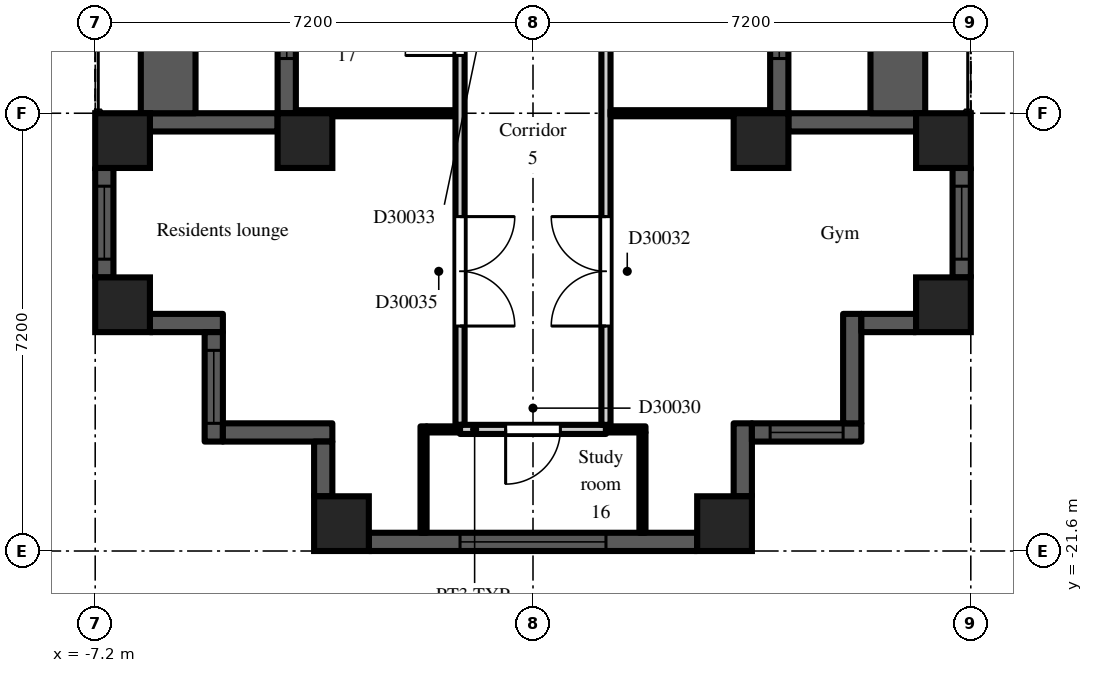
"""IFC4 building model, lengths in metres.
Left out: names, types, materials, properties, quantities, classifications, styles, units other than length and angle.
Written with IfcOpenShell. Run it as: python <this file> out.ifc"""

import sys

from ifc_helpers import new_model, si_unit, direction, frame, frame_2d, origin, origin_2d, place, context, subcontext, project, spatial, rectangle, extrude, element, fill, save


model = new_model("IFC4")
c1 = context("Model", 3, precision=1e-05, world=origin(), true_north=direction((0.0, 1.0)))
c2 = subcontext(c1, "Body", "Model", "MODEL_VIEW")
j1 = project(units=[si_unit("LENGTHUNIT", "METRE"), si_unit("PLANEANGLEUNIT", "RADIAN")], contexts=[c1])
p1 = place(None, origin())
s1 = spatial("IfcSite", under=j1, at=p1, CompositionType="ELEMENT")
p2 = place(p1, origin())
s2 = spatial("IfcBuilding", under=s1, at=p2, CompositionType="ELEMENT")
p3 = place(p2, frame((0.0, 0.0, 207.9)))
s3 = spatial("IfcBuildingStorey", under=s2, at=p3, CompositionType="ELEMENT", Elevation=207.9)
for number, where, z_axis, x_axis in (
    (1, (-6.75, -17.55, 0.0), (0.0, 0.0, 1.0), (1.0, 0.0, 0.0)),
    (2, (-6.75, -14.85, 0.0), (0.0, 0.0, 1.0), (1.0, 0.0, 0.0)),
    (3, (-3.75, -14.85, 0.0), (0.0, 0.0, 1.0), (1.0, 0.0, 0.0)),
    (4, (-3.15, -21.15, 0.0), (0.0, 0.0, 1.0), (1.0, 0.0, 0.0)),
    (5, (3.15, -21.15, 0.0), (0.0, 0.0, 1.0), (1.0, 0.0, 0.0)),
    (6, (3.75, -14.85, 0.0), (0.0, 0.0, 1.0), (1.0, 0.0, 0.0)),
    (7, (6.75, -17.55, 0.0), (0.0, 0.0, 1.0), (1.0, 0.0, 0.0)),
    (8, (6.75, -14.85, 0.0), (0.0, 0.0, 1.0), (1.0, 0.0, 0.0)),
):
    element("IfcColumn", number, at=place(p3, frame(where, z_axis=z_axis, x_axis=x_axis)), inside=s3, PredefinedType="COLUMN", context=c2, shape_type="SweptSolid", body=[
        extrude(rectangle(XDim=0.9, YDim=0.9, at=origin_2d()), origin(), (0.0, 0.0, 1.0), 3.0),
    ])
p4 = place(p3, frame((-4.05, -7.2, 0.0), z_axis=(0.0, 0.0, 1.0), x_axis=(0.0, -1.0, 0.0)))
e9 = element("IfcWall", 9, at=p4, inside=s3, PredefinedType="SOLIDWALL", context=c2, shape_type="SweptSolid", body=[
    extrude(rectangle(XDim=7.2, YDim=0.3, at=frame_2d((3.6, 0.0))), origin(), (0.0, 0.0, 1.0), 2.3),
])
p5 = place(p4, frame((3.0, 0.0, 0.0)))
e10 = element("IfcOpeningElement", 10, at=p5, cuts=e9, PredefinedType="OPENING", context=c2, shape_type="SweptSolid", body=[
    extrude(rectangle(XDim=1.2, YDim=2.05, at=frame_2d((0.6, 1.025))), frame((0.0, 0.16, 0.0), z_axis=(0.0, -1.0, 0.0), x_axis=(1.0, 0.0, 0.0)), (0.0, 0.0, 1.0), 0.32),
])
p6 = place(p4, frame((0.9, 0.0, 0.2)))
e11 = element("IfcOpeningElement", 11, at=p6, cuts=e9, PredefinedType="OPENING", context=c2, shape_type="SweptSolid", body=[
    extrude(rectangle(XDim=1.8, YDim=1.85, at=frame_2d((0.9, 0.925))), frame((0.0, 0.16, 0.0), z_axis=(0.0, -1.0, 0.0), x_axis=(1.0, 0.0, 0.0)), (0.0, 0.0, 1.0), 0.32),
])
p7 = place(p4, frame((4.5, 0.0, 0.2)))
e12 = element("IfcOpeningElement", 12, at=p7, cuts=e9, PredefinedType="OPENING", context=c2, shape_type="SweptSolid", body=[
    extrude(rectangle(XDim=1.8, YDim=1.85, at=frame_2d((0.9, 0.925))), frame((0.0, 0.16, 0.0), z_axis=(0.0, -1.0, 0.0), x_axis=(1.0, 0.0, 0.0)), (0.0, 0.0, 1.0), 0.32),
])
p8 = place(p3, frame((-4.2, -14.55, 0.0), z_axis=(0.0, 0.0, 1.0), x_axis=(-1.0, 0.0, 0.0)))
e13 = element("IfcWall", 13, at=p8, inside=s3, PredefinedType="SOLIDWALL", context=c2, shape_type="SweptSolid", body=[
    extrude(rectangle(XDim=2.1, YDim=0.3, at=frame_2d((1.05, 0.0))), origin(), (0.0, 0.0, 1.0), 2.3),
])
p9 = place(p3, frame((-7.05, -15.3, 0.0), z_axis=(0.0, 0.0, 1.0), x_axis=(0.0, -1.0, 0.0)))
e14 = element("IfcWall", 14, at=p9, inside=s3, PredefinedType="SOLIDWALL", context=c2, shape_type="SweptSolid", body=[
    extrude(rectangle(XDim=1.8, YDim=0.3, at=frame_2d((0.9, 0.0))), origin(), (0.0, 0.0, 1.0), 2.3),
])
p10 = place(p9, frame((0.3, 0.0, 0.2)))
e15 = element("IfcOpeningElement", 15, at=p10, cuts=e14, PredefinedType="OPENING", context=c2, shape_type="SweptSolid", body=[
    extrude(rectangle(XDim=1.2, YDim=1.85, at=frame_2d((0.6, 0.925))), frame((0.0, 0.16, 0.0), z_axis=(0.0, -1.0, 0.0), x_axis=(1.0, 0.0, 0.0)), (0.0, 0.0, 1.0), 0.32),
])
p11 = place(p3, frame((-6.3, -17.85, 0.0), z_axis=(0.0, 0.0, 1.0), x_axis=(1.0, 0.0, 0.0)))
e16 = element("IfcWall", 16, at=p11, inside=s3, PredefinedType="SOLIDWALL", context=c2, shape_type="SweptSolid", body=[
    extrude(rectangle(XDim=1.2, YDim=0.3, at=frame_2d((0.6, 0.0))), origin(), (0.0, 0.0, 1.0), 2.6),
])
p12 = place(p3, frame((-5.25, -18.0, 0.0), z_axis=(0.0, 0.0, 1.0), x_axis=(0.0, -1.0, 0.0)))
e17 = element("IfcWall", 17, at=p12, inside=s3, PredefinedType="SOLIDWALL", context=c2, shape_type="SweptSolid", body=[
    extrude(rectangle(XDim=1.8, YDim=0.3, at=frame_2d((0.9, 0.0))), origin(), (0.0, 0.0, 1.0), 2.6),
])
p13 = place(p12, frame((0.3, 0.0, 0.2)))
e18 = element("IfcOpeningElement", 18, at=p13, cuts=e17, PredefinedType="OPENING", context=c2, shape_type="SweptSolid", body=[
    extrude(rectangle(XDim=1.2, YDim=1.85, at=frame_2d((0.6, 0.925))), frame((0.0, 0.16, 0.0), z_axis=(0.0, -1.0, 0.0), x_axis=(1.0, 0.0, 0.0)), (0.0, 0.0, 1.0), 0.32),
])
p14 = place(p3, frame((-5.1, -19.65, 0.0), z_axis=(0.0, 0.0, 1.0), x_axis=(1.0, 0.0, 0.0)))
e19 = element("IfcWall", 19, at=p14, inside=s3, PredefinedType="SOLIDWALL", context=c2, shape_type="SweptSolid", body=[
    extrude(rectangle(XDim=1.8, YDim=0.3, at=frame_2d((0.9, 0.0))), origin(), (0.0, 0.0, 1.0), 2.6),
])
p15 = place(p3, frame((-3.45, -19.8, 0.0), z_axis=(0.0, 0.0, 1.0), x_axis=(0.0, -1.0, 0.0)))
e20 = element("IfcWall", 20, at=p15, inside=s3, PredefinedType="SOLIDWALL", context=c2, shape_type="SweptSolid", body=[
    extrude(rectangle(XDim=0.9, YDim=0.3, at=frame_2d((0.45, 0.0))), origin(), (0.0, 0.0, 1.0), 2.6),
])
p16 = place(p3, frame((-2.7, -21.45, 0.0), z_axis=(0.0, 0.0, 1.0), x_axis=(1.0, 0.0, 0.0)))
e21 = element("IfcWall", 21, at=p16, inside=s3, PredefinedType="SOLIDWALL", context=c2, shape_type="SweptSolid", body=[
    extrude(rectangle(XDim=5.4, YDim=0.3, at=frame_2d((2.7, 0.0))), origin(), (0.0, 0.0, 1.0), 2.3),
])
p17 = place(p16, frame((1.5, 0.0, 0.2)))
e22 = element("IfcOpeningElement", 22, at=p17, cuts=e21, PredefinedType="OPENING", context=c2, shape_type="SweptSolid", body=[
    extrude(rectangle(XDim=2.4, YDim=1.85, at=frame_2d((1.2, 0.925))), frame((0.0, 0.16, 0.0), z_axis=(0.0, -1.0, 0.0), x_axis=(1.0, 0.0, 0.0)), (0.0, 0.0, 1.0), 0.32),
])
p18 = place(p3, frame((3.45, -20.7, 0.0), z_axis=(0.0, 0.0, 1.0), x_axis=(0.0, 1.0, 0.0)))
e23 = element("IfcWall", 23, at=p18, inside=s3, PredefinedType="SOLIDWALL", context=c2, shape_type="SweptSolid", body=[
    extrude(rectangle(XDim=1.2, YDim=0.3, at=frame_2d((0.6, 0.0))), origin(), (0.0, 0.0, 1.0), 2.6),
])
p19 = place(p3, frame((3.6, -19.65, 0.0), z_axis=(0.0, 0.0, 1.0), x_axis=(1.0, 0.0, 0.0)))
e24 = element("IfcWall", 24, at=p19, inside=s3, PredefinedType="SOLIDWALL", context=c2, shape_type="SweptSolid", body=[
    extrude(rectangle(XDim=1.8, YDim=0.3, at=frame_2d((0.9, 0.0))), origin(), (0.0, 0.0, 1.0), 2.6),
])
p20 = place(p19, frame((0.3, 0.0, 0.2)))
e25 = element("IfcOpeningElement", 25, at=p20, cuts=e24, PredefinedType="OPENING", context=c2, shape_type="SweptSolid", body=[
    extrude(rectangle(XDim=1.2, YDim=1.85, at=frame_2d((0.6, 0.925))), frame((0.0, 0.16, 0.0), z_axis=(0.0, -1.0, 0.0), x_axis=(1.0, 0.0, 0.0)), (0.0, 0.0, 1.0), 0.32),
])
p21 = place(p3, frame((5.25, -19.5, 0.0), z_axis=(0.0, 0.0, 1.0), x_axis=(0.0, 1.0, 0.0)))
e26 = element("IfcWall", 26, at=p21, inside=s3, PredefinedType="SOLIDWALL", context=c2, shape_type="SweptSolid", body=[
    extrude(rectangle(XDim=1.8, YDim=0.3, at=frame_2d((0.9, 0.0))), origin(), (0.0, 0.0, 1.0), 2.6),
])
p22 = place(p3, frame((5.4, -17.85, 0.0), z_axis=(0.0, 0.0, 1.0), x_axis=(1.0, 0.0, 0.0)))
e27 = element("IfcWall", 27, at=p22, inside=s3, PredefinedType="SOLIDWALL", context=c2, shape_type="SweptSolid", body=[
    extrude(rectangle(XDim=0.9, YDim=0.3, at=frame_2d((0.45, 0.0))), origin(), (0.0, 0.0, 1.0), 2.6),
])
p23 = place(p3, frame((7.05, -17.1, 0.0), z_axis=(0.0, 0.0, 1.0), x_axis=(0.0, 1.0, 0.0)))
e28 = element("IfcWall", 28, at=p23, inside=s3, PredefinedType="SOLIDWALL", context=c2, shape_type="SweptSolid", body=[
    extrude(rectangle(XDim=1.8, YDim=0.3, at=frame_2d((0.9, 0.0))), origin(), (0.0, 0.0, 1.0), 2.3),
])
p24 = place(p23, frame((0.3, 0.0, 0.2)))
e29 = element("IfcOpeningElement", 29, at=p24, cuts=e28, PredefinedType="OPENING", context=c2, shape_type="SweptSolid", body=[
    extrude(rectangle(XDim=1.2, YDim=1.85, at=frame_2d((0.6, 0.925))), frame((0.0, 0.16, 0.0), z_axis=(0.0, -1.0, 0.0), x_axis=(1.0, 0.0, 0.0)), (0.0, 0.0, 1.0), 0.32),
])
p25 = place(p3, frame((6.3, -14.55, 0.0), z_axis=(0.0, 0.0, 1.0), x_axis=(-1.0, 0.0, 0.0)))
e30 = element("IfcWall", 30, at=p25, inside=s3, PredefinedType="SOLIDWALL", context=c2, shape_type="SweptSolid", body=[
    extrude(rectangle(XDim=2.1, YDim=0.3, at=frame_2d((1.05, 0.0))), origin(), (0.0, 0.0, 1.0), 2.3),
])
p26 = place(p3, frame((4.05, -14.4, 0.0), z_axis=(0.0, 0.0, 1.0), x_axis=(0.0, 1.0, 0.0)))
e31 = element("IfcWall", 31, at=p26, inside=s3, PredefinedType="SOLIDWALL", context=c2, shape_type="SweptSolid", body=[
    extrude(rectangle(XDim=7.2, YDim=0.3, at=frame_2d((3.6, 0.0))), origin(), (0.0, 0.0, 1.0), 2.3),
])
p27 = place(p26, frame((3.0, 0.0, 0.0)))
e32 = element("IfcOpeningElement", 32, at=p27, cuts=e31, PredefinedType="OPENING", context=c2, shape_type="SweptSolid", body=[
    extrude(rectangle(XDim=1.2, YDim=2.05, at=frame_2d((0.6, 1.025))), frame((0.0, 0.16, 0.0), z_axis=(0.0, -1.0, 0.0), x_axis=(1.0, 0.0, 0.0)), (0.0, 0.0, 1.0), 0.32),
])
p28 = place(p26, frame((0.9, 0.0, 0.2)))
e33 = element("IfcOpeningElement", 33, at=p28, cuts=e31, PredefinedType="OPENING", context=c2, shape_type="SweptSolid", body=[
    extrude(rectangle(XDim=1.8, YDim=1.85, at=frame_2d((0.9, 0.925))), frame((0.0, 0.16, 0.0), z_axis=(0.0, -1.0, 0.0), x_axis=(1.0, 0.0, 0.0)), (0.0, 0.0, 1.0), 0.32),
])
p29 = place(p26, frame((4.5, 0.0, 0.2)))
e34 = element("IfcOpeningElement", 34, at=p29, cuts=e31, PredefinedType="OPENING", context=c2, shape_type="SweptSolid", body=[
    extrude(rectangle(XDim=1.8, YDim=1.85, at=frame_2d((0.9, 0.925))), frame((0.0, 0.16, 0.0), z_axis=(0.0, -1.0, 0.0), x_axis=(1.0, 0.0, 0.0)), (0.0, 0.0, 1.0), 0.32),
])
for number, where, z_axis, x_axis in (
    (35, (6.0, -14.4, 0.0), (0.0, 0.0, 1.0), (0.0, 1.0, 0.0)),
    (36, (-6.0, -14.4, 0.0), (0.0, 0.0, 1.0), (0.0, 1.0, 0.0)),
):
    element("IfcWall", number, at=place(p3, frame(where, z_axis=z_axis, x_axis=x_axis)), inside=s3, PredefinedType="PARAPET", context=c2, shape_type="SweptSolid", body=[
        extrude(rectangle(XDim=7.2, YDim=0.9, at=frame_2d((3.6, 0.0))), origin(), (0.0, 0.0, 1.0), 0.8),
    ])
p30 = place(p3, frame((-3.9, -14.4, 0.0), z_axis=(0.0, 0.0, 1.0), x_axis=(1.0, 0.0, 0.0)))
e37 = element("IfcWall", 37, at=p30, inside=s3, PredefinedType="PARTITIONING", context=c2, shape_type="SweptSolid", body=[
    extrude(rectangle(XDim=2.625, YDim=0.1, at=frame_2d((1.312, 0.0))), origin(), (0.0, 0.0, 1.0), 2.6),
])
p31 = place(p3, frame((-1.8, -21.3, 0.0), z_axis=(0.0, 0.0, 1.0), x_axis=(0.0, 1.0, 0.0)))
e38 = element("IfcWall", 38, at=p31, inside=s3, PredefinedType="PARTITIONING", context=c2, shape_type="SweptSolid", body=[
    extrude(rectangle(XDim=1.75, YDim=0.1, at=frame_2d((0.875, 0.0))), origin(), (0.0, 0.0, 1.0), 2.6),
])
p32 = place(p3, frame((-1.75, -19.6, 0.0), z_axis=(0.0, 0.0, 1.0), x_axis=(1.0, 0.0, 0.0)))
e39 = element("IfcWall", 39, at=p32, inside=s3, PredefinedType="PARTITIONING", context=c2, shape_type="SweptSolid", body=[
    extrude(rectangle(XDim=0.55, YDim=0.1, at=frame_2d((0.275, 0.0))), origin(), (0.0, 0.0, 1.0), 2.6),
])
p33 = place(p3, frame((-1.2, -19.525, 0.0), z_axis=(0.0, 0.0, 1.0), x_axis=(0.0, 1.0, 0.0)))
e40 = element("IfcWall", 40, at=p33, inside=s3, PredefinedType="PARTITIONING", context=c2, shape_type="SweptSolid", body=[
    extrude(rectangle(XDim=18.25, YDim=0.15, at=frame_2d((9.125, 0.0))), origin(), (0.0, 0.0, 1.0), 2.6),
])
p34 = place(p33, frame((6.075, 0.0, 0.0)))
e41 = element("IfcOpeningElement", 41, at=p34, cuts=e40, PredefinedType="OPENING", context=c2, shape_type="SweptSolid", body=[
    extrude(rectangle(XDim=0.9, YDim=2.1, at=frame_2d((0.45, 1.05))), frame((0.0, 0.085, 0.0), z_axis=(0.0, -1.0, 0.0), x_axis=(1.0, 0.0, 0.0)), (0.0, 0.0, 1.0), 0.17),
])
p35 = place(p33, frame((9.675, 0.0, 0.0)))
e42 = element("IfcOpeningElement", 42, at=p35, cuts=e40, PredefinedType="OPENING", context=c2, shape_type="SweptSolid", body=[
    extrude(rectangle(XDim=0.9, YDim=2.1, at=frame_2d((0.45, 1.05))), frame((0.0, 0.085, 0.0), z_axis=(0.0, -1.0, 0.0), x_axis=(1.0, 0.0, 0.0)), (0.0, 0.0, 1.0), 0.17),
])
p36 = place(p33, frame((1.625, 0.0, 0.0)))
e43 = element("IfcOpeningElement", 43, at=p36, cuts=e40, PredefinedType="OPENING", context=c2, shape_type="SweptSolid", body=[
    extrude(rectangle(XDim=1.8, YDim=2.1, at=frame_2d((0.9, 1.05))), frame((0.0, 0.085, 0.0), z_axis=(0.0, -1.0, 0.0), x_axis=(1.0, 0.0, 0.0)), (0.0, 0.0, 1.0), 0.17),
])
p37 = place(p3, frame((-1.2, -19.6, 0.0), z_axis=(0.0, 0.0, 1.0), x_axis=(1.0, 0.0, 0.0)))
e44 = element("IfcWall", 44, at=p37, inside=s3, PredefinedType="PARTITIONING", context=c2, shape_type="SweptSolid", body=[
    extrude(rectangle(XDim=2.4, YDim=0.15, at=frame_2d((1.2, 0.0))), origin(), (0.0, 0.0, 1.0), 2.6),
])
p38 = place(p37, frame((0.75, 0.0, 0.0)))
e45 = element("IfcOpeningElement", 45, at=p38, cuts=e44, PredefinedType="OPENING", context=c2, shape_type="SweptSolid", body=[
    extrude(rectangle(XDim=0.9, YDim=2.1, at=frame_2d((0.45, 1.05))), frame((0.0, 0.085, 0.0), z_axis=(0.0, -1.0, 0.0), x_axis=(1.0, 0.0, 0.0)), (0.0, 0.0, 1.0), 0.17),
])
p39 = place(p3, frame((1.2, -19.525, 0.0), z_axis=(0.0, 0.0, 1.0), x_axis=(0.0, 1.0, 0.0)))
e46 = element("IfcWall", 46, at=p39, inside=s3, PredefinedType="PARTITIONING", context=c2, shape_type="SweptSolid", body=[
    extrude(rectangle(XDim=18.4, YDim=0.15, at=frame_2d((9.2, 0.0))), origin(), (0.0, 0.0, 1.0), 2.6),
])
p40 = place(p39, frame((16.675, 0.0, 0.0)))
e47 = element("IfcOpeningElement", 47, at=p40, cuts=e46, PredefinedType="OPENING", context=c2, shape_type="SweptSolid", body=[
    extrude(rectangle(XDim=0.9, YDim=2.1, at=frame_2d((0.45, 1.05))), frame((0.0, 0.085, 0.0), z_axis=(0.0, -1.0, 0.0), x_axis=(1.0, 0.0, 0.0)), (0.0, 0.0, 1.0), 0.17),
])
p41 = place(p39, frame((13.675, 0.0, 0.0)))
e48 = element("IfcOpeningElement", 48, at=p41, cuts=e46, PredefinedType="OPENING", context=c2, shape_type="SweptSolid", body=[
    extrude(rectangle(XDim=0.9, YDim=2.1, at=frame_2d((0.45, 1.05))), frame((0.0, 0.085, 0.0), z_axis=(0.0, -1.0, 0.0), x_axis=(1.0, 0.0, 0.0)), (0.0, 0.0, 1.0), 0.17),
])
p42 = place(p39, frame((6.475, 0.0, 0.0)))
e49 = element("IfcOpeningElement", 49, at=p42, cuts=e46, PredefinedType="OPENING", context=c2, shape_type="SweptSolid", body=[
    extrude(rectangle(XDim=0.9, YDim=2.1, at=frame_2d((0.45, 1.05))), frame((0.0, 0.085, 0.0), z_axis=(0.0, -1.0, 0.0), x_axis=(1.0, 0.0, 0.0)), (0.0, 0.0, 1.0), 0.17),
])
p43 = place(p39, frame((1.625, 0.0, 0.0)))
e50 = element("IfcOpeningElement", 50, at=p43, cuts=e46, PredefinedType="OPENING", context=c2, shape_type="SweptSolid", body=[
    extrude(rectangle(XDim=1.8, YDim=2.1, at=frame_2d((0.9, 1.05))), frame((0.0, 0.085, 0.0), z_axis=(0.0, -1.0, 0.0), x_axis=(1.0, 0.0, 0.0)), (0.0, 0.0, 1.0), 0.17),
])
p44 = place(p3, frame((1.2, -19.6, 0.0), z_axis=(0.0, 0.0, 1.0), x_axis=(1.0, 0.0, 0.0)))
e51 = element("IfcWall", 51, at=p44, inside=s3, PredefinedType="PARTITIONING", context=c2, shape_type="SweptSolid", body=[
    extrude(rectangle(XDim=0.65, YDim=0.1, at=frame_2d((0.325, 0.0))), origin(), (0.0, 0.0, 1.0), 2.6),
])
p45 = place(p3, frame((1.275, -14.4, 0.0), z_axis=(0.0, 0.0, 1.0), x_axis=(1.0, 0.0, 0.0)))
e52 = element("IfcWall", 52, at=p45, inside=s3, PredefinedType="PARTITIONING", context=c2, shape_type="SweptSolid", body=[
    extrude(rectangle(XDim=2.625, YDim=0.1, at=frame_2d((1.312, 0.0))), origin(), (0.0, 0.0, 1.0), 2.6),
])
p46 = place(p3, frame((1.8, -21.3, 0.0), z_axis=(0.0, 0.0, 1.0), x_axis=(0.0, 1.0, 0.0)))
e53 = element("IfcWall", 53, at=p46, inside=s3, PredefinedType="PARTITIONING", context=c2, shape_type="SweptSolid", body=[
    extrude(rectangle(XDim=1.65, YDim=0.1, at=frame_2d((0.825, 0.0))), origin(), (0.0, 0.0, 1.0), 2.6),
])
p47 = place(p7, origin())
e54 = element("IfcWindow", 54, at=p47, inside=s3, PartitioningType="SINGLE_PANEL", PredefinedType="WINDOW", context=c2, shape_type="SweptSolid", body=[
    extrude(rectangle(XDim=1.8, YDim=1.85, at=frame_2d((0.9, 0.925))), frame((0.0, 0.03, 0.0), z_axis=(0.0, -1.0, 0.0), x_axis=(1.0, 0.0, 0.0)), (0.0, 0.0, 1.0), 0.06),
])
fill(e12, e54)
p48 = place(p10, origin())
e55 = element("IfcWindow", 55, at=p48, inside=s3, PartitioningType="SINGLE_PANEL", PredefinedType="WINDOW", context=c2, shape_type="SweptSolid", body=[
    extrude(rectangle(XDim=1.2, YDim=1.85, at=frame_2d((0.6, 0.925))), frame((0.0, 0.03, 0.0), z_axis=(0.0, -1.0, 0.0), x_axis=(1.0, 0.0, 0.0)), (0.0, 0.0, 1.0), 0.06),
])
fill(e15, e55)
p49 = place(p13, origin())
e56 = element("IfcWindow", 56, at=p49, inside=s3, PartitioningType="SINGLE_PANEL", PredefinedType="WINDOW", context=c2, shape_type="SweptSolid", body=[
    extrude(rectangle(XDim=1.2, YDim=1.85, at=frame_2d((0.6, 0.925))), frame((0.0, 0.03, 0.0), z_axis=(0.0, -1.0, 0.0), x_axis=(1.0, 0.0, 0.0)), (0.0, 0.0, 1.0), 0.06),
])
fill(e18, e56)
p50 = place(p17, origin())
e57 = element("IfcWindow", 57, at=p50, inside=s3, PartitioningType="SINGLE_PANEL", PredefinedType="WINDOW", context=c2, shape_type="SweptSolid", body=[
    extrude(rectangle(XDim=2.4, YDim=1.85, at=frame_2d((1.2, 0.925))), frame((0.0, 0.03, 0.0), z_axis=(0.0, -1.0, 0.0), x_axis=(1.0, 0.0, 0.0)), (0.0, 0.0, 1.0), 0.06),
])
fill(e22, e57)
p51 = place(p20, origin())
e58 = element("IfcWindow", 58, at=p51, inside=s3, PartitioningType="SINGLE_PANEL", PredefinedType="WINDOW", context=c2, shape_type="SweptSolid", body=[
    extrude(rectangle(XDim=1.2, YDim=1.85, at=frame_2d((0.6, 0.925))), frame((0.0, 0.03, 0.0), z_axis=(0.0, -1.0, 0.0), x_axis=(1.0, 0.0, 0.0)), (0.0, 0.0, 1.0), 0.06),
])
fill(e25, e58)
p52 = place(p24, origin())
e59 = element("IfcWindow", 59, at=p52, inside=s3, PartitioningType="SINGLE_PANEL", PredefinedType="WINDOW", context=c2, shape_type="SweptSolid", body=[
    extrude(rectangle(XDim=1.2, YDim=1.85, at=frame_2d((0.6, 0.925))), frame((0.0, 0.03, 0.0), z_axis=(0.0, -1.0, 0.0), x_axis=(1.0, 0.0, 0.0)), (0.0, 0.0, 1.0), 0.06),
])
fill(e29, e59)
p53 = place(p28, origin())
e60 = element("IfcWindow", 60, at=p53, inside=s3, PartitioningType="SINGLE_PANEL", PredefinedType="WINDOW", context=c2, shape_type="SweptSolid", body=[
    extrude(rectangle(XDim=1.8, YDim=1.85, at=frame_2d((0.9, 0.925))), frame((0.0, 0.03, 0.0), z_axis=(0.0, -1.0, 0.0), x_axis=(1.0, 0.0, 0.0)), (0.0, 0.0, 1.0), 0.06),
])
fill(e33, e60)
p54 = place(p38, frame((0.9, 0.0, 0.0), z_axis=(0.0, 0.0, 1.0), x_axis=(-1.0, 0.0, 0.0)))
e61 = element("IfcDoor", 61, at=p54, inside=s3, OperationType="SINGLE_SWING_RIGHT", PredefinedType="DOOR", context=c2, shape_type="SweptSolid", body=[
    extrude(rectangle(XDim=0.9, YDim=2.1, at=frame_2d((0.45, 1.05))), frame((0.0, 0.025, 0.0), z_axis=(0.0, -1.0, 0.0), x_axis=(1.0, 0.0, 0.0)), (0.0, 0.0, 1.0), 0.05),
])
fill(e45, e61)
p55 = place(p43, origin())
e62 = element("IfcDoor", 62, at=p55, inside=s3, OperationType="DOUBLE_DOOR_DOUBLE_SWING", PredefinedType="DOOR", context=c2, shape_type="SweptSolid", body=[
    extrude(rectangle(XDim=1.8, YDim=2.1, at=frame_2d((0.9, 1.05))), frame((0.0, 0.025, 0.0), z_axis=(0.0, -1.0, 0.0), x_axis=(1.0, 0.0, 0.0)), (0.0, 0.0, 1.0), 0.05),
])
fill(e50, e62)
p56 = place(p34, origin())
e63 = element("IfcDoor", 63, at=p56, inside=s3, OperationType="SINGLE_SWING_LEFT", PredefinedType="DOOR", context=c2, shape_type="SweptSolid", body=[
    extrude(rectangle(XDim=0.9, YDim=2.1, at=frame_2d((0.45, 1.05))), frame((0.0, 0.025, 0.0), z_axis=(0.0, -1.0, 0.0), x_axis=(1.0, 0.0, 0.0)), (0.0, 0.0, 1.0), 0.05),
])
fill(e41, e63)
p57 = place(p36, frame((1.8, 0.0, 0.0), z_axis=(0.0, 0.0, 1.0), x_axis=(-1.0, 0.0, 0.0)))
e64 = element("IfcDoor", 64, at=p57, inside=s3, OperationType="DOUBLE_DOOR_DOUBLE_SWING", PredefinedType="DOOR", context=c2, shape_type="SweptSolid", body=[
    extrude(rectangle(XDim=1.8, YDim=2.1, at=frame_2d((0.9, 1.05))), frame((0.0, 0.025, 0.0), z_axis=(0.0, -1.0, 0.0), x_axis=(1.0, 0.0, 0.0)), (0.0, 0.0, 1.0), 0.05),
])
fill(e43, e64)
save(model, sys.argv[1])
